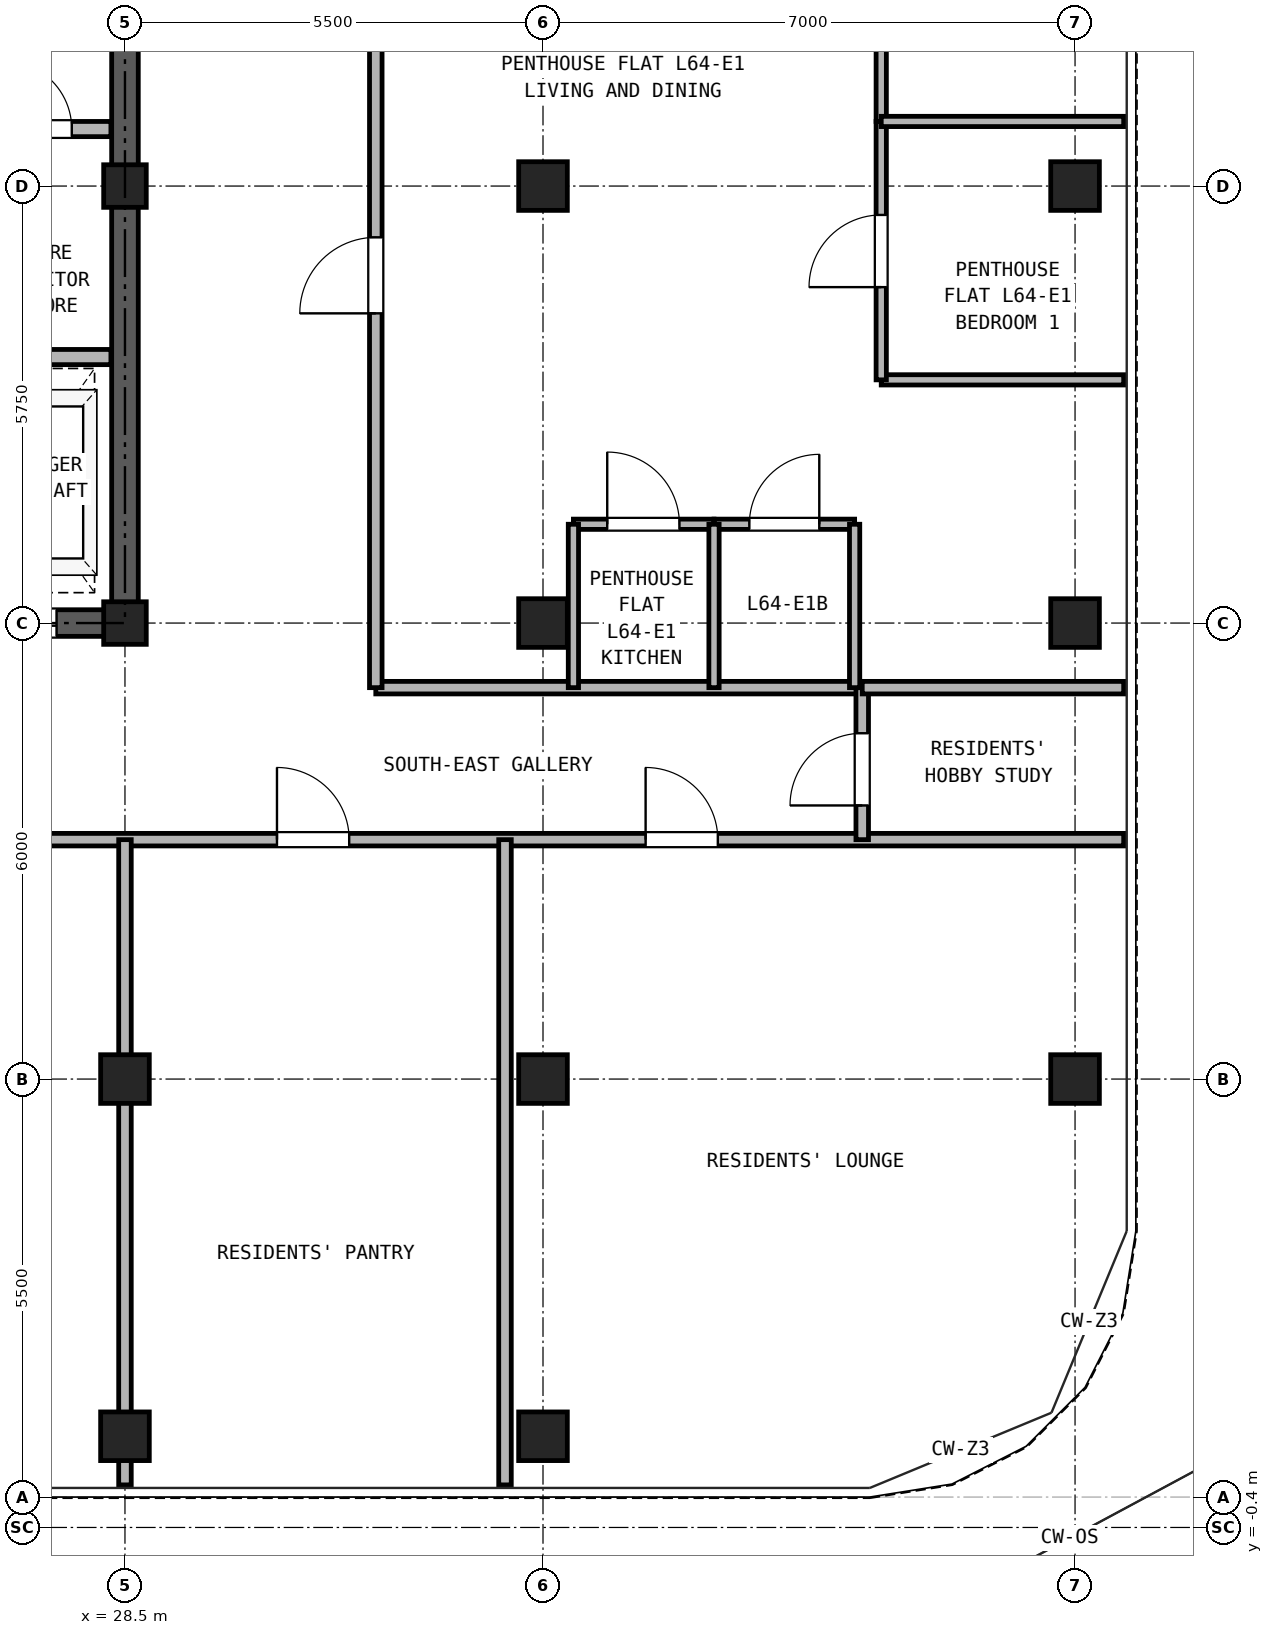
"""IFC4 building model, lengths in metres.
Left out: names, types, materials, properties, quantities, classifications, styles, units other than length and angle.
Written with IfcOpenShell. Run it as: python <this file> out.ifc"""

import sys

from ifc_helpers import new_model, si_unit, direction, frame, frame_2d, origin, origin_2d, place, context, subcontext, project, spatial, rectangle, hollow_rectangle, extrude, source, transform, mapped, element, fill, save


model = new_model("IFC4")
c1 = context("Model", 3, precision=1e-05, world=origin(), true_north=direction((0.0, 1.0)))
c2 = subcontext(c1, "Body", "Model", "MODEL_VIEW")
j1 = project(units=[si_unit("LENGTHUNIT", "METRE"), si_unit("PLANEANGLEUNIT", "RADIAN")], contexts=[c1])
p1 = place(None, origin())
s1 = spatial("IfcSite", under=j1, at=p1, CompositionType="ELEMENT")
p2 = place(p1, origin())
s2 = spatial("IfcBuilding", under=s1, at=p2, CompositionType="ELEMENT")
p3 = place(p2, frame((0.0, 0.0, 226.5)))
s3 = spatial("IfcBuildingStorey", under=s2, at=p3, CompositionType="ELEMENT", Elevation=226.5)
m1 = source(origin(), c2, "Body", "SweptSolid", [
    extrude(hollow_rectangle(XDim=0.64, YDim=0.64, WallThickness=0.035, at=origin_2d()), origin(), (0.0, 0.0, 1.0), 2.98),
])
for number, where, z_axis, x_axis in (
    (1, (28.5, 0.8, 0.0), (0.0, 0.0, 1.0), (1.0, 0.0, 0.0)),
    (2, (34.0, 0.8, 0.0), (0.0, 0.0, 1.0), (1.0, 0.0, 0.0)),
    (3, (41.0, 5.5, 0.0), (0.0, 0.0, 1.0), (1.0, 0.0, 0.0)),
    (4, (41.0, 11.5, 0.0), (0.0, 0.0, 1.0), (1.0, 0.0, 0.0)),
    (5, (41.0, 17.25, 0.0), (0.0, 0.0, 1.0), (1.0, 0.0, 0.0)),
    (6, (28.5, 5.5, 0.0), (0.0, 0.0, 1.0), (1.0, 0.0, 0.0)),
):
    element("IfcColumn", number, at=place(p3, frame(where, z_axis=z_axis, x_axis=x_axis)), inside=s3, PredefinedType="COLUMN", context=c2, shape_type="MappedRepresentation", body=[
        mapped(m1, transform((0.0, 0.0, 0.0), x_axis=(1.0, 0.0, 0.0), y_axis=(0.0, 1.0, 0.0), z_axis=(0.0, 0.0, 1.0), scale=1.0)),
    ])
m2 = source(origin(), c2, "Body", "SweptSolid", [
    extrude(hollow_rectangle(XDim=0.56, YDim=0.56, WallThickness=0.03, at=origin_2d()), origin(), (0.0, 0.0, 1.0), 2.98),
])
for number, where, z_axis, x_axis in (
    (7, (28.5, 11.5, 0.0), (0.0, 0.0, 1.0), (1.0, 0.0, 0.0)),
    (8, (28.5, 17.25, 0.0), (0.0, 0.0, 1.0), (1.0, 0.0, 0.0)),
):
    element("IfcColumn", number, at=place(p3, frame(where, z_axis=z_axis, x_axis=x_axis)), inside=s3, PredefinedType="COLUMN", context=c2, shape_type="MappedRepresentation", body=[
        mapped(m2, transform((0.0, 0.0, 0.0), x_axis=(1.0, 0.0, 0.0), y_axis=(0.0, 1.0, 0.0), z_axis=(0.0, 0.0, 1.0), scale=1.0)),
    ])
for number, where, z_axis, x_axis in (
    (9, (34.0, 5.5, 0.0), (0.0, 0.0, 1.0), (1.0, 0.0, 0.0)),
    (10, (34.0, 11.5, 0.0), (0.0, 0.0, 1.0), (1.0, 0.0, 0.0)),
    (11, (34.0, 17.25, 0.0), (0.0, 0.0, 1.0), (1.0, 0.0, 0.0)),
):
    element("IfcColumn", number, at=place(p3, frame(where, z_axis=z_axis, x_axis=x_axis)), inside=s3, PredefinedType="COLUMN", context=c2, shape_type="MappedRepresentation", body=[
        mapped(m1, transform((0.0, 0.0, 0.0), x_axis=(1.0, 0.0, 0.0), y_axis=(0.0, 1.0, 0.0), z_axis=(0.0, 0.0, 1.0), scale=1.0)),
    ])
p4 = place(p3, frame((18.325, 11.5, 0.0), z_axis=(0.0, 0.0, 1.0), x_axis=(1.0, 0.0, 0.0)))
e12 = element("IfcWall", 12, at=p4, inside=s3, PredefinedType="SHEAR", context=c2, shape_type="SweptSolid", body=[
    extrude(rectangle(XDim=10.35, YDim=0.35, at=frame_2d((5.175, 0.0))), origin(), (0.0, 0.0, 1.0), 2.98),
])
p5 = place(p4, frame((1.775, 0.0, 0.0)))
e13 = element("IfcOpeningElement", 13, at=p5, cuts=e12, PredefinedType="OPENING", context=c2, shape_type="SweptSolid", body=[
    extrude(rectangle(XDim=0.95, YDim=2.15, at=frame_2d((0.475, 1.075))), frame((0.0, 0.185, 0.0), z_axis=(0.0, -1.0, 0.0), x_axis=(1.0, 0.0, 0.0)), (0.0, 0.0, 1.0), 0.37),
])
p6 = place(p4, frame((5.275, 0.0, 0.0)))
e14 = element("IfcOpeningElement", 14, at=p6, cuts=e12, PredefinedType="OPENING", context=c2, shape_type="SweptSolid", body=[
    extrude(rectangle(XDim=0.95, YDim=2.15, at=frame_2d((0.475, 1.075))), frame((0.0, 0.185, 0.0), z_axis=(0.0, -1.0, 0.0), x_axis=(1.0, 0.0, 0.0)), (0.0, 0.0, 1.0), 0.37),
])
p7 = place(p4, frame((8.175, 0.0, 0.0)))
e15 = element("IfcOpeningElement", 15, at=p7, cuts=e12, PredefinedType="OPENING", context=c2, shape_type="SweptSolid", body=[
    extrude(rectangle(XDim=1.1, YDim=2.25, at=frame_2d((0.55, 1.125))), frame((0.0, 0.185, 0.0), z_axis=(0.0, -1.0, 0.0), x_axis=(1.0, 0.0, 0.0)), (0.0, 0.0, 1.0), 0.37),
])
p8 = place(p3, frame((28.5, 11.675, 0.0), z_axis=(0.0, 0.0, 1.0), x_axis=(0.0, 1.0, 0.0)))
e16 = element("IfcWall", 16, at=p8, inside=s3, PredefinedType="SHEAR", context=c2, shape_type="SweptSolid", body=[
    extrude(rectangle(XDim=16.9, YDim=0.35, at=frame_2d((8.45, 0.0))), origin(), (0.0, 0.0, 1.0), 2.98),
])
p9 = place(p8, frame((7.475, 0.0, 0.0)))
e17 = element("IfcOpeningElement", 17, at=p9, cuts=e16, PredefinedType="OPENING", context=c2, shape_type="SweptSolid", body=[
    extrude(rectangle(XDim=1.15, YDim=2.2, at=frame_2d((0.575, 1.1))), frame((0.0, 0.185, 0.0), z_axis=(0.0, -1.0, 0.0), x_axis=(1.0, 0.0, 0.0)), (0.0, 0.0, 1.0), 0.37),
])
p10 = place(p3, frame((18.685, 18.0, 0.0), z_axis=(0.0, 0.0, 1.0), x_axis=(1.0, 0.0, 0.0)))
e18 = element("IfcWall", 18, at=p10, inside=s3, PredefinedType="PARTITIONING", context=c2, shape_type="SweptSolid", body=[
    extrude(rectangle(XDim=9.63, YDim=0.2, at=frame_2d((4.815, 0.0))), origin(), (0.0, 0.0, 1.0), 2.98),
])
p11 = place(p10, frame((0.565, 0.0, 0.0)))
e19 = element("IfcOpeningElement", 19, at=p11, cuts=e18, PredefinedType="OPENING", context=c2, shape_type="SweptSolid", body=[
    extrude(rectangle(XDim=1.3, YDim=2.3, at=frame_2d((0.65, 1.15))), frame((0.0, 0.11, 0.0), z_axis=(0.0, -1.0, 0.0), x_axis=(1.0, 0.0, 0.0)), (0.0, 0.0, 1.0), 0.22),
])
p12 = place(p10, frame((2.665, 0.0, 0.0)))
e20 = element("IfcOpeningElement", 20, at=p12, cuts=e18, PredefinedType="OPENING", context=c2, shape_type="SweptSolid", body=[
    extrude(rectangle(XDim=1.3, YDim=2.3, at=frame_2d((0.65, 1.15))), frame((0.0, 0.11, 0.0), z_axis=(0.0, -1.0, 0.0), x_axis=(1.0, 0.0, 0.0)), (0.0, 0.0, 1.0), 0.22),
])
p13 = place(p10, frame((5.085, 0.0, 0.0)))
e21 = element("IfcOpeningElement", 21, at=p13, cuts=e18, PredefinedType="OPENING", context=c2, shape_type="SweptSolid", body=[
    extrude(rectangle(XDim=0.9, YDim=2.05, at=frame_2d((0.45, 1.025))), frame((0.0, 0.11, 0.0), z_axis=(0.0, -1.0, 0.0), x_axis=(1.0, 0.0, 0.0)), (0.0, 0.0, 1.0), 0.22),
])
p14 = place(p10, frame((8.215, 0.0, 0.0)))
e22 = element("IfcOpeningElement", 22, at=p14, cuts=e18, PredefinedType="OPENING", context=c2, shape_type="SweptSolid", body=[
    extrude(rectangle(XDim=0.9, YDim=2.05, at=frame_2d((0.45, 1.025))), frame((0.0, 0.11, 0.0), z_axis=(0.0, -1.0, 0.0), x_axis=(1.0, 0.0, 0.0)), (0.0, 0.0, 1.0), 0.22),
])
p15 = place(p3, frame((18.685, 15.0, 0.0), z_axis=(0.0, 0.0, 1.0), x_axis=(1.0, 0.0, 0.0)))
e23 = element("IfcWall", 23, at=p15, inside=s3, PredefinedType="PARTITIONING", context=c2, shape_type="SweptSolid", body=[
    extrude(rectangle(XDim=9.63, YDim=0.2, at=frame_2d((4.815, 0.0))), origin(), (0.0, 0.0, 1.0), 2.98),
])
p16 = place(p3, frame((5.36, 8.65, 0.0), z_axis=(0.0, 0.0, 1.0), x_axis=(1.0, 0.0, 0.0)))
e24 = element("IfcWall", 24, at=p16, inside=s3, PredefinedType="PARTITIONING", context=c2, shape_type="SweptSolid", body=[
    extrude(rectangle(XDim=36.28, YDim=0.165, at=frame_2d((18.14, 0.0))), origin(), (0.0, 0.0, 1.0), 2.655),
])
p17 = place(p16, frame((8.17, 0.0, 0.0)))
e25 = element("IfcOpeningElement", 25, at=p17, cuts=e24, PredefinedType="OPENING", context=c2, shape_type="SweptSolid", body=[
    extrude(rectangle(XDim=0.95, YDim=2.15, at=frame_2d((0.475, 1.075))), frame((0.0, 0.093, 0.0), z_axis=(0.0, -1.0, 0.0), x_axis=(1.0, 0.0, 0.0)), (0.0, 0.0, 1.0), 0.185),
])
p18 = place(p16, frame((18.14, 0.0, 0.0)))
e26 = element("IfcOpeningElement", 26, at=p18, cuts=e24, PredefinedType="OPENING", context=c2, shape_type="SweptSolid", body=[
    extrude(rectangle(XDim=0.95, YDim=2.15, at=frame_2d((0.475, 1.075))), frame((0.0, 0.093, 0.0), z_axis=(0.0, -1.0, 0.0), x_axis=(1.0, 0.0, 0.0)), (0.0, 0.0, 1.0), 0.185),
])
p19 = place(p16, frame((25.14, 0.0, 0.0)))
e27 = element("IfcOpeningElement", 27, at=p19, cuts=e24, PredefinedType="OPENING", context=c2, shape_type="SweptSolid", body=[
    extrude(rectangle(XDim=0.95, YDim=2.15, at=frame_2d((0.475, 1.075))), frame((0.0, 0.093, 0.0), z_axis=(0.0, -1.0, 0.0), x_axis=(1.0, 0.0, 0.0)), (0.0, 0.0, 1.0), 0.185),
])
p20 = place(p16, frame((29.99, 0.0, 0.0)))
e28 = element("IfcOpeningElement", 28, at=p20, cuts=e24, PredefinedType="OPENING", context=c2, shape_type="SweptSolid", body=[
    extrude(rectangle(XDim=0.95, YDim=2.15, at=frame_2d((0.475, 1.075))), frame((0.0, 0.093, 0.0), z_axis=(0.0, -1.0, 0.0), x_axis=(1.0, 0.0, 0.0)), (0.0, 0.0, 1.0), 0.185),
])
p21 = place(p3, frame((31.8, 10.65, 0.0), z_axis=(0.0, 0.0, 1.0), x_axis=(1.0, 0.0, 0.0)))
e29 = element("IfcWall", 29, at=p21, inside=s3, PredefinedType="PARTITIONING", context=c2, shape_type="SweptSolid", body=[
    extrude(rectangle(XDim=6.4, YDim=0.165, at=frame_2d((3.2, 0.0))), origin(), (0.0, 0.0, 1.0), 2.98),
])
p22 = place(p3, frame((38.2, 8.65, 0.0), z_axis=(0.0, 0.0, 1.0), x_axis=(0.0, 1.0, 0.0)))
e30 = element("IfcWall", 30, at=p22, inside=s3, PredefinedType="PARTITIONING", context=c2, shape_type="SweptSolid", body=[
    extrude(rectangle(XDim=2.0, YDim=0.165, at=frame_2d((1.0, 0.0))), origin(), (0.0, 0.0, 1.0), 2.98),
])
p23 = place(p22, frame((0.45, 0.0, 0.0)))
e31 = element("IfcOpeningElement", 31, at=p23, cuts=e30, PredefinedType="OPENING", context=c2, shape_type="SweptSolid", body=[
    extrude(rectangle(XDim=0.95, YDim=2.15, at=frame_2d((0.475, 1.075))), frame((0.0, 0.093, 0.0), z_axis=(0.0, -1.0, 0.0), x_axis=(1.0, 0.0, 0.0)), (0.0, 0.0, 1.0), 0.185),
])
p24 = place(p3, frame((31.8, 10.65, 0.0), z_axis=(0.0, 0.0, 1.0), x_axis=(0.0, 1.0, 0.0)))
e32 = element("IfcWall", 32, at=p24, inside=s3, PredefinedType="PARTITIONING", context=c2, shape_type="SweptSolid", body=[
    extrude(rectangle(XDim=24.49, YDim=0.165, at=frame_2d((12.245, 0.0))), origin(), (0.0, 0.0, 1.0), 2.98),
])
p25 = place(p24, frame((4.925, 0.0, 0.0)))
e33 = element("IfcOpeningElement", 33, at=p25, cuts=e32, PredefinedType="OPENING", context=c2, shape_type="SweptSolid", body=[
    extrude(rectangle(XDim=1.0, YDim=2.15, at=frame_2d((0.5, 1.075))), frame((0.0, 0.093, 0.0), z_axis=(0.0, -1.0, 0.0), x_axis=(1.0, 0.0, 0.0)), (0.0, 0.0, 1.0), 0.185),
])
p26 = place(p24, frame((15.5, 0.0, 0.0)))
e34 = element("IfcOpeningElement", 34, at=p26, cuts=e32, PredefinedType="OPENING", context=c2, shape_type="SweptSolid", body=[
    extrude(rectangle(XDim=1.0, YDim=2.15, at=frame_2d((0.5, 1.075))), frame((0.0, 0.093, 0.0), z_axis=(0.0, -1.0, 0.0), x_axis=(1.0, 0.0, 0.0)), (0.0, 0.0, 1.0), 0.185),
])
p27 = place(p3, frame((28.5, 0.16, 0.0), z_axis=(0.0, 0.0, 1.0), x_axis=(0.0, 1.0, 0.0)))
e35 = element("IfcWall", 35, at=p27, inside=s3, PredefinedType="PARTITIONING", context=c2, shape_type="SweptSolid", body=[
    extrude(rectangle(XDim=8.49, YDim=0.165, at=frame_2d((4.245, 0.0))), origin(), (0.0, 0.0, 1.0), 2.428),
])
p28 = place(p3, frame((33.5, 0.16, 0.0), z_axis=(0.0, 0.0, 1.0), x_axis=(0.0, 1.0, 0.0)))
e36 = element("IfcWall", 36, at=p28, inside=s3, PredefinedType="PARTITIONING", context=c2, shape_type="SweptSolid", body=[
    extrude(rectangle(XDim=8.49, YDim=0.165, at=frame_2d((4.245, 0.0))), origin(), (0.0, 0.0, 1.0), 2.98),
])
p29 = place(p3, frame((38.2, 10.65, 0.0), z_axis=(0.0, 0.0, 1.0), x_axis=(1.0, 0.0, 0.0)))
e37 = element("IfcWall", 37, at=p29, inside=s3, PredefinedType="PARTITIONING", context=c2, shape_type="SweptSolid", body=[
    extrude(rectangle(XDim=3.44, YDim=0.165, at=frame_2d((1.72, 0.0))), origin(), (0.0, 0.0, 1.0), 2.98),
])
p30 = place(p3, frame((34.4, 12.8, 0.0), z_axis=(0.0, 0.0, 1.0), x_axis=(1.0, 0.0, 0.0)))
e38 = element("IfcWall", 38, at=p30, inside=s3, PredefinedType="PARTITIONING", context=c2, shape_type="SweptSolid", body=[
    extrude(rectangle(XDim=1.85, YDim=0.135, at=frame_2d((0.925, 0.0))), origin(), (0.0, 0.0, 1.0), 2.98),
])
p31 = place(p30, frame((0.445, 0.0, 0.0)))
e39 = element("IfcOpeningElement", 39, at=p31, cuts=e38, PredefinedType="OPENING", context=c2, shape_type="SweptSolid", body=[
    extrude(rectangle(XDim=0.95, YDim=2.15, at=frame_2d((0.475, 1.075))), frame((0.0, 0.077, 0.0), z_axis=(0.0, -1.0, 0.0), x_axis=(1.0, 0.0, 0.0)), (0.0, 0.0, 1.0), 0.155),
])
p32 = place(p3, frame((36.25, 12.8, 0.0), z_axis=(0.0, 0.0, 1.0), x_axis=(1.0, 0.0, 0.0)))
e40 = element("IfcWall", 40, at=p32, inside=s3, PredefinedType="PARTITIONING", context=c2, shape_type="SweptSolid", body=[
    extrude(rectangle(XDim=1.85, YDim=0.135, at=frame_2d((0.925, 0.0))), origin(), (0.0, 0.0, 1.0), 2.98),
])
p33 = place(p32, frame((0.465, 0.0, 0.0)))
e41 = element("IfcOpeningElement", 41, at=p33, cuts=e40, PredefinedType="OPENING", context=c2, shape_type="SweptSolid", body=[
    extrude(rectangle(XDim=0.92, YDim=2.1, at=frame_2d((0.46, 1.05))), frame((0.0, 0.077, 0.0), z_axis=(0.0, -1.0, 0.0), x_axis=(1.0, 0.0, 0.0)), (0.0, 0.0, 1.0), 0.155),
])
for number, where, z_axis, x_axis in (
    (42, (34.4, 10.65, 0.0), (0.0, 0.0, 1.0), (0.0, 1.0, 0.0)),
    (43, (36.25, 10.65, 0.0), (0.0, 0.0, 1.0), (0.0, 1.0, 0.0)),
    (44, (38.1, 10.65, 0.0), (0.0, 0.0, 1.0), (0.0, 1.0, 0.0)),
):
    element("IfcWall", number, at=place(p3, frame(where, z_axis=z_axis, x_axis=x_axis)), inside=s3, PredefinedType="PARTITIONING", context=c2, shape_type="SweptSolid", body=[
        extrude(rectangle(XDim=2.15, YDim=0.135, at=frame_2d((1.075, 0.0))), origin(), (0.0, 0.0, 1.0), 2.98),
    ])
p34 = place(p3, frame((38.45, 14.7, 0.0), z_axis=(0.0, 0.0, 1.0), x_axis=(1.0, 0.0, 0.0)))
e45 = element("IfcWall", 45, at=p34, inside=s3, PredefinedType="PARTITIONING", context=c2, shape_type="SweptSolid", body=[
    extrude(rectangle(XDim=3.19, YDim=0.135, at=frame_2d((1.595, 0.0))), origin(), (0.0, 0.0, 1.0), 2.98),
])
p35 = place(p3, frame((38.45, 14.7, 0.0), z_axis=(0.0, 0.0, 1.0), x_axis=(0.0, 1.0, 0.0)))
e46 = element("IfcWall", 46, at=p35, inside=s3, PredefinedType="PARTITIONING", context=c2, shape_type="SweptSolid", body=[
    extrude(rectangle(XDim=3.4, YDim=0.135, at=frame_2d((1.7, 0.0))), origin(), (0.0, 0.0, 1.0), 2.98),
])
p36 = place(p35, frame((1.22, 0.0, 0.0)))
e47 = element("IfcOpeningElement", 47, at=p36, cuts=e46, PredefinedType="OPENING", context=c2, shape_type="SweptSolid", body=[
    extrude(rectangle(XDim=0.95, YDim=2.15, at=frame_2d((0.475, 1.075))), frame((0.0, 0.077, 0.0), z_axis=(0.0, -1.0, 0.0), x_axis=(1.0, 0.0, 0.0)), (0.0, 0.0, 1.0), 0.155),
])
p37 = place(p3, frame((38.45, 18.1, 0.0), z_axis=(0.0, 0.0, 1.0), x_axis=(0.0, 1.0, 0.0)))
e48 = element("IfcWall", 48, at=p37, inside=s3, PredefinedType="PARTITIONING", context=c2, shape_type="SweptSolid", body=[
    extrude(rectangle(XDim=3.4, YDim=0.135, at=frame_2d((1.7, 0.0))), origin(), (0.0, 0.0, 1.0), 2.98),
])
p38 = place(p37, frame((1.22, 0.0, 0.0)))
e49 = element("IfcOpeningElement", 49, at=p38, cuts=e48, PredefinedType="OPENING", context=c2, shape_type="SweptSolid", body=[
    extrude(rectangle(XDim=0.95, YDim=2.15, at=frame_2d((0.475, 1.075))), frame((0.0, 0.077, 0.0), z_axis=(0.0, -1.0, 0.0), x_axis=(1.0, 0.0, 0.0)), (0.0, 0.0, 1.0), 0.155),
])
p39 = place(p3, frame((38.45, 18.1, 0.0), z_axis=(0.0, 0.0, 1.0), x_axis=(1.0, 0.0, 0.0)))
e50 = element("IfcWall", 50, at=p39, inside=s3, PredefinedType="PARTITIONING", context=c2, shape_type="SweptSolid", body=[
    extrude(rectangle(XDim=3.19, YDim=0.135, at=frame_2d((1.595, 0.0))), origin(), (0.0, 0.0, 1.0), 2.98),
])
p40 = place(p14, frame((0.9, 0.0, 0.0), z_axis=(0.0, 0.0, 1.0), x_axis=(-1.0, 0.0, 0.0)))
e51 = element("IfcDoor", 51, at=p40, inside=s3, OperationType="SINGLE_SWING_LEFT", PredefinedType="DOOR", context=c2, shape_type="SweptSolid", body=[
    extrude(rectangle(XDim=0.9, YDim=2.05, at=frame_2d((0.45, 1.025))), frame((0.0, 0.025, 0.0), z_axis=(0.0, -1.0, 0.0), x_axis=(1.0, 0.0, 0.0)), (0.0, 0.0, 1.0), 0.05),
])
fill(e22, e51)
p41 = place(p7, frame((1.1, 0.0, 0.0), z_axis=(0.0, 0.0, 1.0), x_axis=(-1.0, 0.0, 0.0)))
e52 = element("IfcDoor", 52, at=p41, inside=s3, OperationType="DOUBLE_DOOR_SLIDING", PredefinedType="DOOR", context=c2, shape_type="SweptSolid", body=[
    extrude(rectangle(XDim=1.1, YDim=2.25, at=frame_2d((0.55, 1.125))), frame((0.0, 0.025, 0.0), z_axis=(0.0, -1.0, 0.0), x_axis=(1.0, 0.0, 0.0)), (0.0, 0.0, 1.0), 0.05),
])
fill(e15, e52)
p42 = place(p19, frame((0.95, 0.0, 0.0), z_axis=(0.0, 0.0, 1.0), x_axis=(-1.0, 0.0, 0.0)))
e53 = element("IfcDoor", 53, at=p42, inside=s3, OperationType="SINGLE_SWING_LEFT", PredefinedType="DOOR", context=c2, shape_type="SweptSolid", body=[
    extrude(rectangle(XDim=0.95, YDim=2.15, at=frame_2d((0.475, 1.075))), frame((0.0, 0.025, 0.0), z_axis=(0.0, -1.0, 0.0), x_axis=(1.0, 0.0, 0.0)), (0.0, 0.0, 1.0), 0.05),
])
fill(e27, e53)
p43 = place(p20, frame((0.95, 0.0, 0.0), z_axis=(0.0, 0.0, 1.0), x_axis=(-1.0, 0.0, 0.0)))
e54 = element("IfcDoor", 54, at=p43, inside=s3, OperationType="SINGLE_SWING_LEFT", PredefinedType="DOOR", context=c2, shape_type="SweptSolid", body=[
    extrude(rectangle(XDim=0.95, YDim=2.15, at=frame_2d((0.475, 1.075))), frame((0.0, 0.025, 0.0), z_axis=(0.0, -1.0, 0.0), x_axis=(1.0, 0.0, 0.0)), (0.0, 0.0, 1.0), 0.05),
])
fill(e28, e54)
p44 = place(p23, origin())
e55 = element("IfcDoor", 55, at=p44, inside=s3, OperationType="SINGLE_SWING_LEFT", PredefinedType="DOOR", context=c2, shape_type="SweptSolid", body=[
    extrude(rectangle(XDim=0.95, YDim=2.15, at=frame_2d((0.475, 1.075))), frame((0.0, 0.025, 0.0), z_axis=(0.0, -1.0, 0.0), x_axis=(1.0, 0.0, 0.0)), (0.0, 0.0, 1.0), 0.05),
])
fill(e31, e55)
p45 = place(p31, origin())
e56 = element("IfcDoor", 56, at=p45, inside=s3, OperationType="SINGLE_SWING_LEFT", PredefinedType="DOOR", context=c2, shape_type="SweptSolid", body=[
    extrude(rectangle(XDim=0.95, YDim=2.15, at=frame_2d((0.475, 1.075))), frame((0.0, 0.025, 0.0), z_axis=(0.0, -1.0, 0.0), x_axis=(1.0, 0.0, 0.0)), (0.0, 0.0, 1.0), 0.05),
])
fill(e39, e56)
p46 = place(p33, origin())
e57 = element("IfcDoor", 57, at=p46, inside=s3, OperationType="SINGLE_SWING_RIGHT", PredefinedType="DOOR", context=c2, shape_type="SweptSolid", body=[
    extrude(rectangle(XDim=0.92, YDim=2.1, at=frame_2d((0.46, 1.05))), frame((0.0, 0.025, 0.0), z_axis=(0.0, -1.0, 0.0), x_axis=(1.0, 0.0, 0.0)), (0.0, 0.0, 1.0), 0.05),
])
fill(e41, e57)
p47 = place(p36, frame((0.95, 0.0, 0.0), z_axis=(0.0, 0.0, 1.0), x_axis=(-1.0, 0.0, 0.0)))
e58 = element("IfcDoor", 58, at=p47, inside=s3, OperationType="SINGLE_SWING_LEFT", PredefinedType="DOOR", context=c2, shape_type="SweptSolid", body=[
    extrude(rectangle(XDim=0.95, YDim=2.15, at=frame_2d((0.475, 1.075))), frame((0.0, 0.025, 0.0), z_axis=(0.0, -1.0, 0.0), x_axis=(1.0, 0.0, 0.0)), (0.0, 0.0, 1.0), 0.05),
])
fill(e47, e58)
p48 = place(p25, frame((1.0, 0.0, 0.0), z_axis=(0.0, 0.0, 1.0), x_axis=(-1.0, 0.0, 0.0)))
e59 = element("IfcDoor", 59, at=p48, inside=s3, OperationType="SINGLE_SWING_LEFT", PredefinedType="DOOR", context=c2, shape_type="SweptSolid", body=[
    extrude(rectangle(XDim=1.0, YDim=2.15, at=frame_2d((0.5, 1.075))), frame((0.0, 0.025, 0.0), z_axis=(0.0, -1.0, 0.0), x_axis=(1.0, 0.0, 0.0)), (0.0, 0.0, 1.0), 0.05),
])
fill(e33, e59)
save(model, sys.argv[1])
